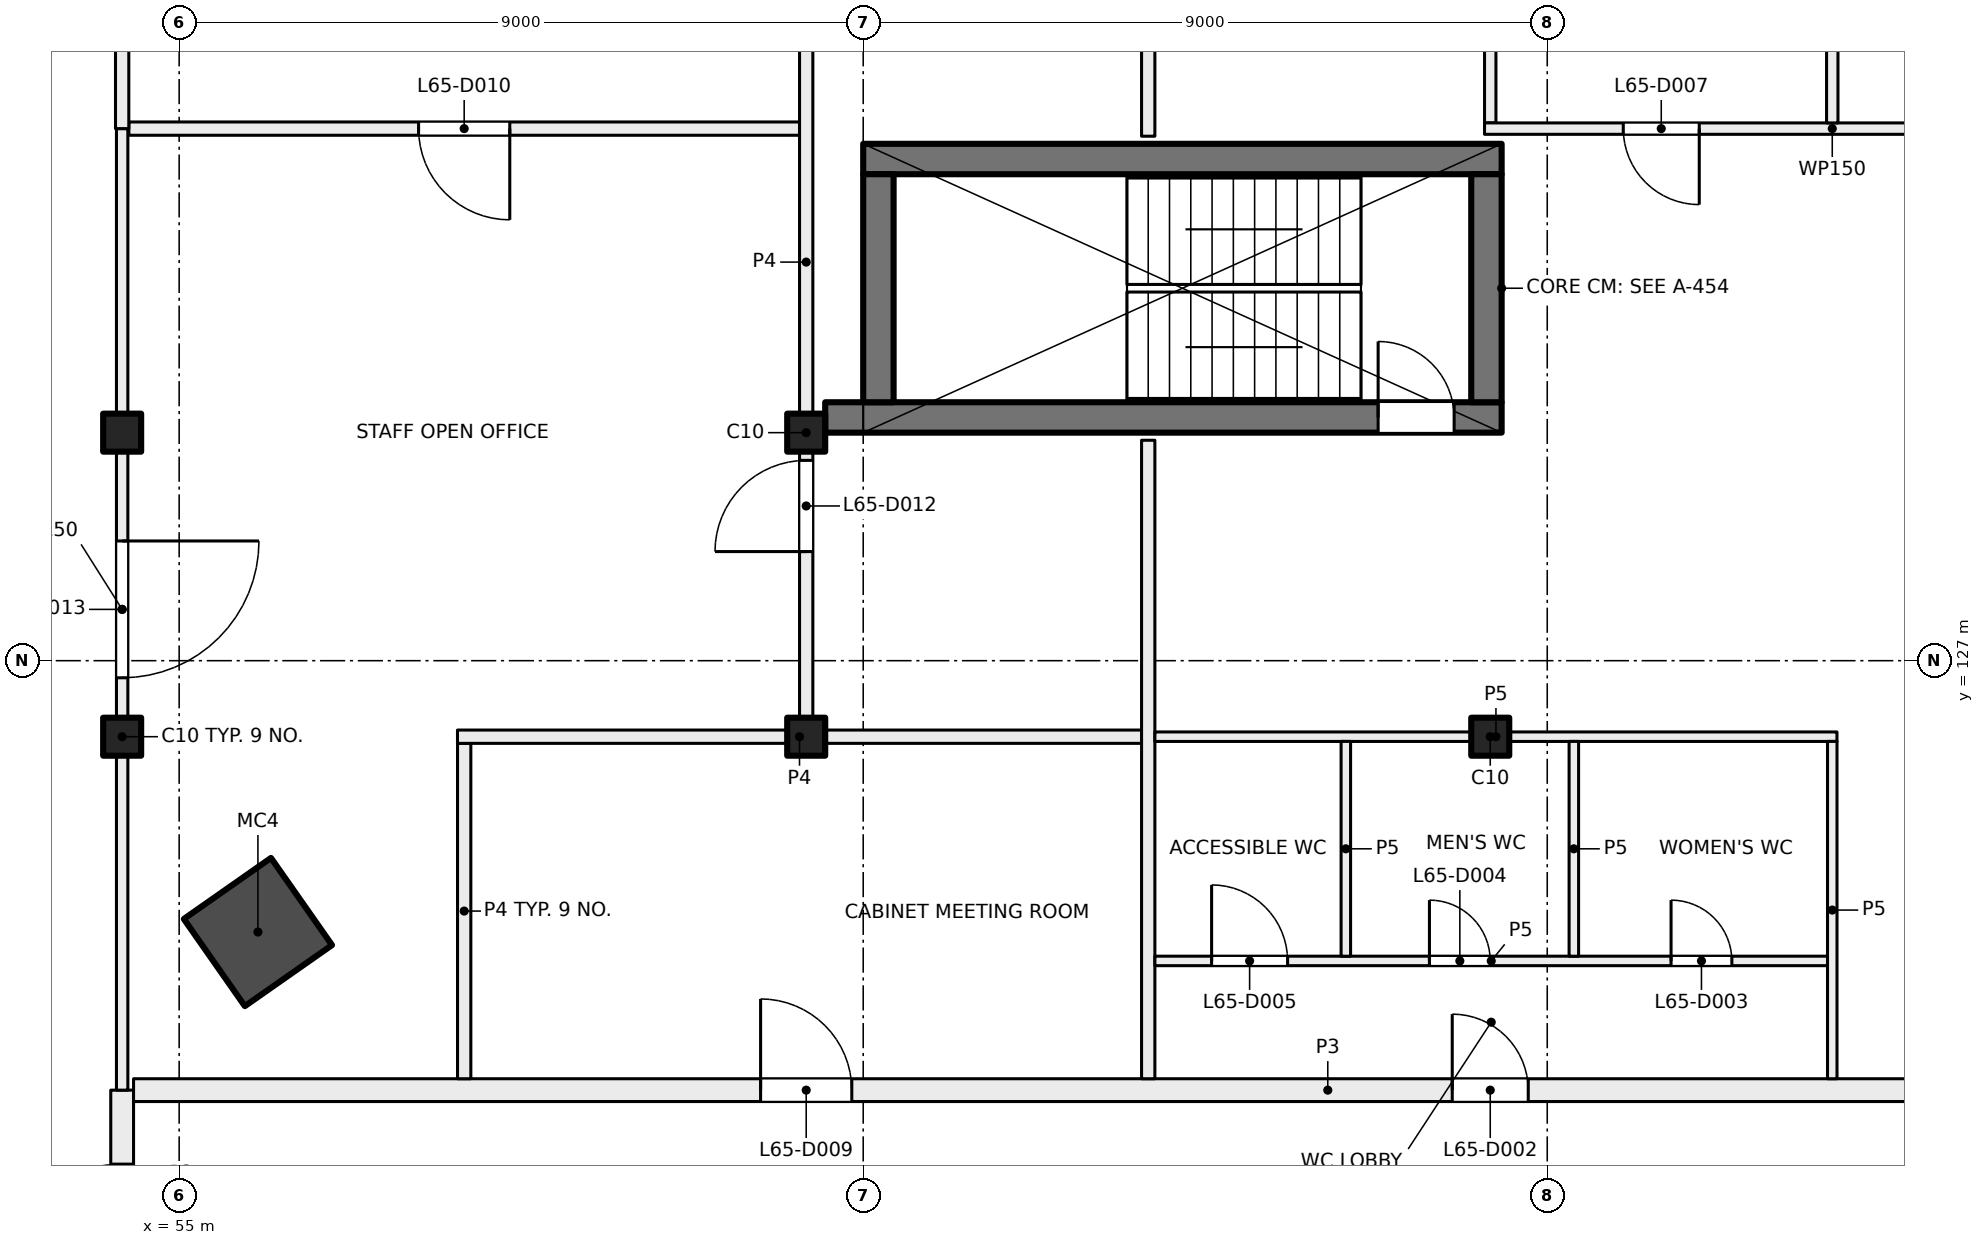
"""IFC4 building model, lengths in metres.
Left out: names, types, materials, properties, quantities, classifications, styles, units other than length and angle.
Written with IfcOpenShell. Run it as: python <this file> out.ifc"""

import sys

from ifc_helpers import new_model, si_unit, direction, frame, frame_2d, origin, origin_2d, place, context, subcontext, project, spatial, rectangle, hollow_rectangle, extrude, element, fill, save


model = new_model("IFC4")
c1 = context("Model", 3, precision=1e-05, world=origin(), true_north=direction((0.0, 1.0)))
c2 = subcontext(c1, "Body", "Model", "MODEL_VIEW")
j1 = project(units=[si_unit("LENGTHUNIT", "METRE"), si_unit("PLANEANGLEUNIT", "RADIAN")], contexts=[c1])
p1 = place(None, origin())
s1 = spatial("IfcSite", under=j1, at=p1, CompositionType="ELEMENT")
p2 = place(p1, origin())
s2 = spatial("IfcBuilding", under=s1, at=p2, CompositionType="ELEMENT")
p3 = place(p2, frame((0.0, 0.0, 273.5)))
s3 = spatial("IfcBuildingStorey", under=s2, at=p3, CompositionType="ELEMENT", Elevation=273.5)
p4 = place(p3, frame((56.036, 123.43, 0.0), z_axis=(0.0, 0.0, 1.0), x_axis=(0.573576436351, -0.819152044289, 0.0)))
e1 = element("IfcColumn", 1, at=p4, inside=s3, PredefinedType="COLUMN", context=c2, shape_type="SweptSolid", body=[
    extrude(hollow_rectangle(XDim=1.4, YDim=1.4, WallThickness=0.025, at=origin_2d()), origin(), (0.0, 0.0, 1.0), 4.0),
])
for number, where, z_axis, x_axis in (
    (2, (54.25, 130.0, 0.0), (0.0, 0.0, 1.0), (1.0, 0.0, 0.0)),
    (3, (63.25, 130.0, 0.0), (0.0, 0.0, 1.0), (1.0, 0.0, 0.0)),
    (4, (54.25, 126.0, 0.0), (0.0, 0.0, 1.0), (1.0, 0.0, 0.0)),
    (5, (63.25, 126.0, 0.0), (0.0, 0.0, 1.0), (1.0, 0.0, 0.0)),
    (6, (72.25, 126.0, 0.0), (0.0, 0.0, 1.0), (1.0, 0.0, 0.0)),
):
    element("IfcColumn", number, at=place(p3, frame(where, z_axis=z_axis, x_axis=x_axis)), inside=s3, PredefinedType="COLUMN", context=c2, shape_type="SweptSolid", body=[
        extrude(rectangle(XDim=0.5, YDim=0.5, at=origin_2d()), origin(), (0.0, 0.0, 1.0), 4.0),
    ])
p5 = place(p3, frame((63.5, 130.2, 0.0), z_axis=(0.0, 0.0, 1.0), x_axis=(1.0, 0.0, 0.0)))
e7 = element("IfcWall", 7, at=p5, inside=s3, PredefinedType="SHEAR", context=c2, shape_type="SweptSolid", body=[
    extrude(rectangle(XDim=8.9, YDim=0.4, at=frame_2d((4.45, 0.0))), origin(), (0.0, 0.0, 1.0), 4.0),
])
p6 = place(p5, frame((7.275, 0.0, 0.0)))
e8 = element("IfcOpeningElement", 8, at=p6, cuts=e7, PredefinedType="OPENING", context=c2, shape_type="SweptSolid", body=[
    extrude(rectangle(XDim=1.0, YDim=2.1, at=frame_2d((0.5, 1.05))), frame((0.0, 0.21, 0.0), z_axis=(0.0, -1.0, 0.0), x_axis=(1.0, 0.0, 0.0)), (0.0, 0.0, 1.0), 0.42),
])
p7 = place(p3, frame((64.0, 133.6, 0.0), z_axis=(0.0, 0.0, 1.0), x_axis=(1.0, 0.0, 0.0)))
e9 = element("IfcWall", 9, at=p7, inside=s3, PredefinedType="SHEAR", context=c2, shape_type="SweptSolid", body=[
    extrude(rectangle(XDim=8.4, YDim=0.4, at=frame_2d((4.2, 0.0))), origin(), (0.0, 0.0, 1.0), 4.0),
])
for number, where, z_axis, x_axis in (
    (10, (64.2, 130.4, 0.0), (0.0, 0.0, 1.0), (0.0, 1.0, 0.0)),
    (11, (72.2, 130.4, 0.0), (0.0, 0.0, 1.0), (0.0, 1.0, 0.0)),
):
    element("IfcWall", number, at=place(p3, frame(where, z_axis=z_axis, x_axis=x_axis)), inside=s3, PredefinedType="SHEAR", context=c2, shape_type="SweptSolid", body=[
        extrude(rectangle(XDim=3.0, YDim=0.4, at=frame_2d((1.5, 0.0))), origin(), (0.0, 0.0, 1.0), 4.0),
    ])
p8 = place(p3, frame((54.25, 117.6, 0.0), z_axis=(0.0, 0.0, 1.0), x_axis=(0.0, 1.0, 0.0)))
e12 = element("IfcWall", 12, at=p8, inside=s3, PredefinedType="PARTITIONING", context=c2, shape_type="SweptSolid", body=[
    extrude(rectangle(XDim=3.75, YDim=0.3, at=frame_2d((1.875, 0.0))), origin(), (0.0, 0.0, 1.0), 3.625),
])
p9 = place(p8, frame((0.977, 0.0, 0.0)))
e13 = element("IfcOpeningElement", 13, at=p9, cuts=e12, PredefinedType="OPENING", context=c2, shape_type="SweptSolid", body=[
    extrude(rectangle(XDim=1.8, YDim=2.1, at=frame_2d((0.9, 1.05))), frame((0.0, 0.16, 0.0), z_axis=(0.0, -1.0, 0.0), x_axis=(1.0, 0.0, 0.0)), (0.0, 0.0, 1.0), 0.32),
])
p10 = place(p3, frame((54.4, 121.35, 0.0), z_axis=(0.0, 0.0, 1.0), x_axis=(1.0, 0.0, 0.0)))
e14 = element("IfcWall", 14, at=p10, inside=s3, PredefinedType="PARTITIONING", context=c2, shape_type="SweptSolid", body=[
    extrude(rectangle(XDim=31.425, YDim=0.3, at=frame_2d((15.712, 0.0))), origin(), (0.0, 0.0, 1.0), 3.625),
])
p11 = place(p10, frame((17.35, 0.0, 0.0)))
e15 = element("IfcOpeningElement", 15, at=p11, cuts=e14, PredefinedType="OPENING", context=c2, shape_type="SweptSolid", body=[
    extrude(rectangle(XDim=1.0, YDim=2.1, at=frame_2d((0.5, 1.05))), frame((0.0, 0.16, 0.0), z_axis=(0.0, -1.0, 0.0), x_axis=(1.0, 0.0, 0.0)), (0.0, 0.0, 1.0), 0.32),
])
p12 = place(p10, frame((25.95, 0.0, 0.0)))
e16 = element("IfcOpeningElement", 16, at=p12, cuts=e14, PredefinedType="OPENING", context=c2, shape_type="SweptSolid", body=[
    extrude(rectangle(XDim=1.8, YDim=2.1, at=frame_2d((0.9, 1.05))), frame((0.0, 0.16, 0.0), z_axis=(0.0, -1.0, 0.0), x_axis=(1.0, 0.0, 0.0)), (0.0, 0.0, 1.0), 0.32),
])
p13 = place(p10, frame((8.25, 0.0, 0.0)))
e17 = element("IfcOpeningElement", 17, at=p13, cuts=e14, PredefinedType="OPENING", context=c2, shape_type="SweptSolid", body=[
    extrude(rectangle(XDim=1.2, YDim=2.1, at=frame_2d((0.6, 1.05))), frame((0.0, 0.16, 0.0), z_axis=(0.0, -1.0, 0.0), x_axis=(1.0, 0.0, 0.0)), (0.0, 0.0, 1.0), 0.32),
])
p14 = place(p3, frame((54.25, 134.0, 0.0), z_axis=(0.0, 0.0, 1.0), x_axis=(0.0, -1.0, 0.0)))
e18 = element("IfcWall", 18, at=p14, inside=s3, PredefinedType="PARTITIONING", context=c2, shape_type="SweptSolid", body=[
    extrude(rectangle(XDim=12.65, YDim=0.15, at=frame_2d((6.325, 0.0))), origin(), (0.0, 0.0, 1.0), 3.625),
])
p15 = place(p14, frame((5.425, 0.0, 0.0)))
e19 = element("IfcOpeningElement", 19, at=p15, cuts=e18, PredefinedType="OPENING", context=c2, shape_type="SweptSolid", body=[
    extrude(rectangle(XDim=1.8, YDim=2.1, at=frame_2d((0.9, 1.05))), frame((0.0, 0.085, 0.0), z_axis=(0.0, -1.0, 0.0), x_axis=(1.0, 0.0, 0.0)), (0.0, 0.0, 1.0), 0.17),
])
p16 = place(p3, frame((63.162, 134.0, 0.0), z_axis=(0.0, 0.0, 1.0), x_axis=(-1.0, 0.0, 0.0)))
e20 = element("IfcWall", 20, at=p16, inside=s3, PredefinedType="PARTITIONING", context=c2, shape_type="SweptSolid", body=[
    extrude(rectangle(XDim=8.824, YDim=0.175, at=frame_2d((4.412, 0.0))), origin(), (0.0, 0.0, 1.0), 3.625),
])
p17 = place(p16, frame((3.812, 0.0, 0.0)))
e21 = element("IfcOpeningElement", 21, at=p17, cuts=e20, PredefinedType="OPENING", context=c2, shape_type="SweptSolid", body=[
    extrude(rectangle(XDim=1.2, YDim=2.1, at=frame_2d((0.6, 1.05))), frame((0.0, 0.097, 0.0), z_axis=(0.0, -1.0, 0.0), x_axis=(1.0, 0.0, 0.0)), (0.0, 0.0, 1.0), 0.195),
])
p18 = place(p3, frame((54.25, 138.4, 0.0), z_axis=(0.0, 0.0, 1.0), x_axis=(0.0, -1.0, 0.0)))
e22 = element("IfcWall", 22, at=p18, inside=s3, PredefinedType="PARTITIONING", context=c2, shape_type="SweptSolid", body=[
    extrude(rectangle(XDim=4.4, YDim=0.175, at=frame_2d((2.2, 0.0))), origin(), (0.0, 0.0, 1.0), 3.625),
])
p19 = place(p3, frame((58.75, 125.912, 0.0), z_axis=(0.0, 0.0, 1.0), x_axis=(0.0, -1.0, 0.0)))
e23 = element("IfcWall", 23, at=p19, inside=s3, PredefinedType="PARTITIONING", context=c2, shape_type="SweptSolid", body=[
    extrude(rectangle(XDim=4.412, YDim=0.175, at=frame_2d((2.206, 0.0))), origin(), (0.0, 0.0, 1.0), 3.625),
])
p20 = place(p3, frame((58.662, 126.0, 0.0), z_axis=(0.0, 0.0, 1.0), x_axis=(1.0, 0.0, 0.0)))
e24 = element("IfcWall", 24, at=p20, inside=s3, PredefinedType="PARTITIONING", context=c2, shape_type="SweptSolid", body=[
    extrude(rectangle(XDim=9.0, YDim=0.175, at=frame_2d((4.5, 0.0))), origin(), (0.0, 0.0, 1.0), 3.625),
])
p21 = place(p3, frame((63.25, 126.088, 0.0), z_axis=(0.0, 0.0, 1.0), x_axis=(0.0, 1.0, 0.0)))
e25 = element("IfcWall", 25, at=p21, inside=s3, PredefinedType="PARTITIONING", context=c2, shape_type="SweptSolid", body=[
    extrude(rectangle(XDim=12.312, YDim=0.175, at=frame_2d((6.156, 0.0))), origin(), (0.0, 0.0, 1.0), 3.625),
])
p22 = place(p21, frame((2.347, 0.0, 0.0)))
e26 = element("IfcOpeningElement", 26, at=p22, cuts=e25, PredefinedType="OPENING", context=c2, shape_type="SweptSolid", body=[
    extrude(rectangle(XDim=1.2, YDim=2.1, at=frame_2d((0.6, 1.05))), frame((0.0, 0.097, 0.0), z_axis=(0.0, -1.0, 0.0), x_axis=(1.0, 0.0, 0.0)), (0.0, 0.0, 1.0), 0.195),
])
p23 = place(p3, frame((67.75, 121.5, 0.0), z_axis=(0.0, 0.0, 1.0), x_axis=(0.0, 1.0, 0.0)))
e27 = element("IfcWall", 27, at=p23, inside=s3, PredefinedType="PARTITIONING", context=c2, shape_type="SweptSolid", body=[
    extrude(rectangle(XDim=8.4, YDim=0.175, at=frame_2d((4.2, 0.0))), origin(), (0.0, 0.0, 1.0), 3.625),
])
p24 = place(p3, frame((67.838, 123.05, 0.0), z_axis=(0.0, 0.0, 1.0), x_axis=(1.0, 0.0, 0.0)))
e28 = element("IfcWall", 28, at=p24, inside=s3, PredefinedType="PARTITIONING", context=c2, shape_type="SweptSolid", body=[
    extrude(rectangle(XDim=8.85, YDim=0.125, at=frame_2d((4.425, 0.0))), origin(), (0.0, 0.0, 1.0), 3.625),
])
p25 = place(p24, frame((6.791, 0.0, 0.0)))
e29 = element("IfcOpeningElement", 29, at=p25, cuts=e28, PredefinedType="OPENING", context=c2, shape_type="SweptSolid", body=[
    extrude(rectangle(XDim=0.8, YDim=2.1, at=frame_2d((0.4, 1.05))), frame((0.0, 0.073, 0.0), z_axis=(0.0, -1.0, 0.0), x_axis=(1.0, 0.0, 0.0)), (0.0, 0.0, 1.0), 0.145),
])
p26 = place(p24, frame((3.612, 0.0, 0.0)))
e30 = element("IfcOpeningElement", 30, at=p26, cuts=e28, PredefinedType="OPENING", context=c2, shape_type="SweptSolid", body=[
    extrude(rectangle(XDim=0.8, YDim=2.1, at=frame_2d((0.4, 1.05))), frame((0.0, 0.073, 0.0), z_axis=(0.0, -1.0, 0.0), x_axis=(1.0, 0.0, 0.0)), (0.0, 0.0, 1.0), 0.145),
])
p27 = place(p24, frame((0.746, 0.0, 0.0)))
e31 = element("IfcOpeningElement", 31, at=p27, cuts=e28, PredefinedType="OPENING", context=c2, shape_type="SweptSolid", body=[
    extrude(rectangle(XDim=1.0, YDim=2.1, at=frame_2d((0.5, 1.05))), frame((0.0, 0.073, 0.0), z_axis=(0.0, -1.0, 0.0), x_axis=(1.0, 0.0, 0.0)), (0.0, 0.0, 1.0), 0.145),
])
p28 = place(p3, frame((67.838, 126.0, 0.0), z_axis=(0.0, 0.0, 1.0), x_axis=(1.0, 0.0, 0.0)))
e32 = element("IfcWall", 32, at=p28, inside=s3, PredefinedType="PARTITIONING", context=c2, shape_type="SweptSolid", body=[
    extrude(rectangle(XDim=8.974, YDim=0.125, at=frame_2d((4.487, 0.0))), origin(), (0.0, 0.0, 1.0), 3.625),
])
p29 = place(p3, frame((67.75, 133.9, 0.0), z_axis=(0.0, 0.0, 1.0), x_axis=(0.0, 1.0, 0.0)))
e33 = element("IfcWall", 33, at=p29, inside=s3, PredefinedType="PARTITIONING", context=c2, shape_type="SweptSolid", body=[
    extrude(rectangle(XDim=4.5, YDim=0.175, at=frame_2d((2.25, 0.0))), origin(), (0.0, 0.0, 1.0), 3.625),
])
p30 = place(p3, frame((70.35, 125.938, 0.0), z_axis=(0.0, 0.0, 1.0), x_axis=(0.0, -1.0, 0.0)))
e34 = element("IfcWall", 34, at=p30, inside=s3, PredefinedType="PARTITIONING", context=c2, shape_type="SweptSolid", body=[
    extrude(rectangle(XDim=2.826, YDim=0.125, at=frame_2d((1.413, 0.0))), origin(), (0.0, 0.0, 1.0), 3.625),
])
p31 = place(p3, frame((72.25, 134.075, 0.0), z_axis=(0.0, 0.0, 1.0), x_axis=(0.0, 1.0, 0.0)))
e35 = element("IfcWall", 35, at=p31, inside=s3, PredefinedType="PARTITIONING", context=c2, shape_type="SweptSolid", body=[
    extrude(rectangle(XDim=4.325, YDim=0.15, at=frame_2d((2.163, 0.0))), origin(), (0.0, 0.0, 1.0), 3.625),
])
p32 = place(p3, frame((81.325, 134.0, 0.0), z_axis=(0.0, 0.0, 1.0), x_axis=(-1.0, 0.0, 0.0)))
e36 = element("IfcWall", 36, at=p32, inside=s3, PredefinedType="PARTITIONING", context=c2, shape_type="SweptSolid", body=[
    extrude(rectangle(XDim=9.15, YDim=0.15, at=frame_2d((4.575, 0.0))), origin(), (0.0, 0.0, 1.0), 3.625),
])
p33 = place(p32, frame((1.825, 0.0, 0.0)))
e37 = element("IfcOpeningElement", 37, at=p33, cuts=e36, PredefinedType="OPENING", context=c2, shape_type="SweptSolid", body=[
    extrude(rectangle(XDim=1.0, YDim=2.1, at=frame_2d((0.5, 1.05))), frame((0.0, 0.085, 0.0), z_axis=(0.0, -1.0, 0.0), x_axis=(1.0, 0.0, 0.0)), (0.0, 0.0, 1.0), 0.17),
])
p34 = place(p32, frame((6.325, 0.0, 0.0)))
e38 = element("IfcOpeningElement", 38, at=p34, cuts=e36, PredefinedType="OPENING", context=c2, shape_type="SweptSolid", body=[
    extrude(rectangle(XDim=1.0, YDim=2.1, at=frame_2d((0.5, 1.05))), frame((0.0, 0.085, 0.0), z_axis=(0.0, -1.0, 0.0), x_axis=(1.0, 0.0, 0.0)), (0.0, 0.0, 1.0), 0.17),
])
p35 = place(p3, frame((73.35, 125.938, 0.0), z_axis=(0.0, 0.0, 1.0), x_axis=(0.0, -1.0, 0.0)))
e39 = element("IfcWall", 39, at=p35, inside=s3, PredefinedType="PARTITIONING", context=c2, shape_type="SweptSolid", body=[
    extrude(rectangle(XDim=2.826, YDim=0.125, at=frame_2d((1.413, 0.0))), origin(), (0.0, 0.0, 1.0), 3.625),
])
p36 = place(p3, frame((76.75, 125.938, 0.0), z_axis=(0.0, 0.0, 1.0), x_axis=(0.0, -1.0, 0.0)))
e40 = element("IfcWall", 40, at=p36, inside=s3, PredefinedType="PARTITIONING", context=c2, shape_type="SweptSolid", body=[
    extrude(rectangle(XDim=4.438, YDim=0.125, at=frame_2d((2.219, 0.0))), origin(), (0.0, 0.0, 1.0), 3.625),
])
p37 = place(p3, frame((76.75, 134.075, 0.0), z_axis=(0.0, 0.0, 1.0), x_axis=(0.0, 1.0, 0.0)))
e41 = element("IfcWall", 41, at=p37, inside=s3, PredefinedType="PARTITIONING", context=c2, shape_type="SweptSolid", body=[
    extrude(rectangle(XDim=4.325, YDim=0.15, at=frame_2d((2.163, 0.0))), origin(), (0.0, 0.0, 1.0), 3.625),
])
p38 = place(p6, origin())
e42 = element("IfcDoor", 42, at=p38, inside=s3, OperationType="SINGLE_SWING_LEFT", PredefinedType="DOOR", context=c2, shape_type="SweptSolid", body=[
    extrude(rectangle(XDim=1.0, YDim=2.1, at=frame_2d((0.5, 1.05))), frame((0.0, 0.025, 0.0), z_axis=(0.0, -1.0, 0.0), x_axis=(1.0, 0.0, 0.0)), (0.0, 0.0, 1.0), 0.05),
])
fill(e8, e42)
p39 = place(p11, origin())
e43 = element("IfcDoor", 43, at=p39, inside=s3, OperationType="SINGLE_SWING_LEFT", PredefinedType="DOOR", context=c2, shape_type="SweptSolid", body=[
    extrude(rectangle(XDim=1.0, YDim=2.1, at=frame_2d((0.5, 1.05))), frame((0.0, 0.025, 0.0), z_axis=(0.0, -1.0, 0.0), x_axis=(1.0, 0.0, 0.0)), (0.0, 0.0, 1.0), 0.05),
])
fill(e15, e43)
p40 = place(p25, origin())
e44 = element("IfcDoor", 44, at=p40, inside=s3, OperationType="SINGLE_SWING_RIGHT", PredefinedType="DOOR", context=c2, shape_type="SweptSolid", body=[
    extrude(rectangle(XDim=0.8, YDim=2.1, at=frame_2d((0.4, 1.05))), frame((0.0, 0.025, 0.0), z_axis=(0.0, -1.0, 0.0), x_axis=(1.0, 0.0, 0.0)), (0.0, 0.0, 1.0), 0.05),
])
fill(e29, e44)
p41 = place(p26, origin())
e45 = element("IfcDoor", 45, at=p41, inside=s3, OperationType="SINGLE_SWING_LEFT", PredefinedType="DOOR", context=c2, shape_type="SweptSolid", body=[
    extrude(rectangle(XDim=0.8, YDim=2.1, at=frame_2d((0.4, 1.05))), frame((0.0, 0.025, 0.0), z_axis=(0.0, -1.0, 0.0), x_axis=(1.0, 0.0, 0.0)), (0.0, 0.0, 1.0), 0.05),
])
fill(e30, e45)
p42 = place(p27, origin())
e46 = element("IfcDoor", 46, at=p42, inside=s3, OperationType="SINGLE_SWING_LEFT", PredefinedType="DOOR", context=c2, shape_type="SweptSolid", body=[
    extrude(rectangle(XDim=1.0, YDim=2.1, at=frame_2d((0.5, 1.05))), frame((0.0, 0.025, 0.0), z_axis=(0.0, -1.0, 0.0), x_axis=(1.0, 0.0, 0.0)), (0.0, 0.0, 1.0), 0.05),
])
fill(e31, e46)
p43 = place(p34, origin())
e47 = element("IfcDoor", 47, at=p43, inside=s3, OperationType="SINGLE_SWING_RIGHT", PredefinedType="DOOR", context=c2, shape_type="SweptSolid", body=[
    extrude(rectangle(XDim=1.0, YDim=2.1, at=frame_2d((0.5, 1.05))), frame((0.0, 0.025, 0.0), z_axis=(0.0, -1.0, 0.0), x_axis=(1.0, 0.0, 0.0)), (0.0, 0.0, 1.0), 0.05),
])
fill(e38, e47)
p44 = place(p13, origin())
e48 = element("IfcDoor", 48, at=p44, inside=s3, OperationType="DOUBLE_DOOR_SINGLE_SWING", PredefinedType="DOOR", context=c2, shape_type="SweptSolid", body=[
    extrude(rectangle(XDim=1.2, YDim=2.1, at=frame_2d((0.6, 1.05))), frame((0.0, 0.025, 0.0), z_axis=(0.0, -1.0, 0.0), x_axis=(1.0, 0.0, 0.0)), (0.0, 0.0, 1.0), 0.05),
])
fill(e17, e48)
p45 = place(p17, origin())
e49 = element("IfcDoor", 49, at=p45, inside=s3, OperationType="DOUBLE_DOOR_SINGLE_SWING", PredefinedType="DOOR", context=c2, shape_type="SweptSolid", body=[
    extrude(rectangle(XDim=1.2, YDim=2.1, at=frame_2d((0.6, 1.05))), frame((0.0, 0.025, 0.0), z_axis=(0.0, -1.0, 0.0), x_axis=(1.0, 0.0, 0.0)), (0.0, 0.0, 1.0), 0.05),
])
fill(e21, e49)
p46 = place(p9, origin())
e50 = element("IfcDoor", 50, at=p46, inside=s3, OperationType="DOUBLE_DOOR_SINGLE_SWING", PredefinedType="DOOR", context=c2, shape_type="SweptSolid", body=[
    extrude(rectangle(XDim=1.8, YDim=2.1, at=frame_2d((0.9, 1.05))), frame((0.0, 0.025, 0.0), z_axis=(0.0, -1.0, 0.0), x_axis=(1.0, 0.0, 0.0)), (0.0, 0.0, 1.0), 0.05),
])
fill(e13, e50)
p47 = place(p22, origin())
e51 = element("IfcDoor", 51, at=p47, inside=s3, OperationType="DOUBLE_DOOR_SINGLE_SWING", PredefinedType="DOOR", context=c2, shape_type="SweptSolid", body=[
    extrude(rectangle(XDim=1.2, YDim=2.1, at=frame_2d((0.6, 1.05))), frame((0.0, 0.025, 0.0), z_axis=(0.0, -1.0, 0.0), x_axis=(1.0, 0.0, 0.0)), (0.0, 0.0, 1.0), 0.05),
])
fill(e26, e51)
p48 = place(p15, origin())
e52 = element("IfcDoor", 52, at=p48, inside=s3, OperationType="DOUBLE_DOOR_SINGLE_SWING", PredefinedType="DOOR", context=c2, shape_type="SweptSolid", body=[
    extrude(rectangle(XDim=1.8, YDim=2.1, at=frame_2d((0.9, 1.05))), frame((0.0, 0.025, 0.0), z_axis=(0.0, -1.0, 0.0), x_axis=(1.0, 0.0, 0.0)), (0.0, 0.0, 1.0), 0.05),
])
fill(e19, e52)
save(model, sys.argv[1])
